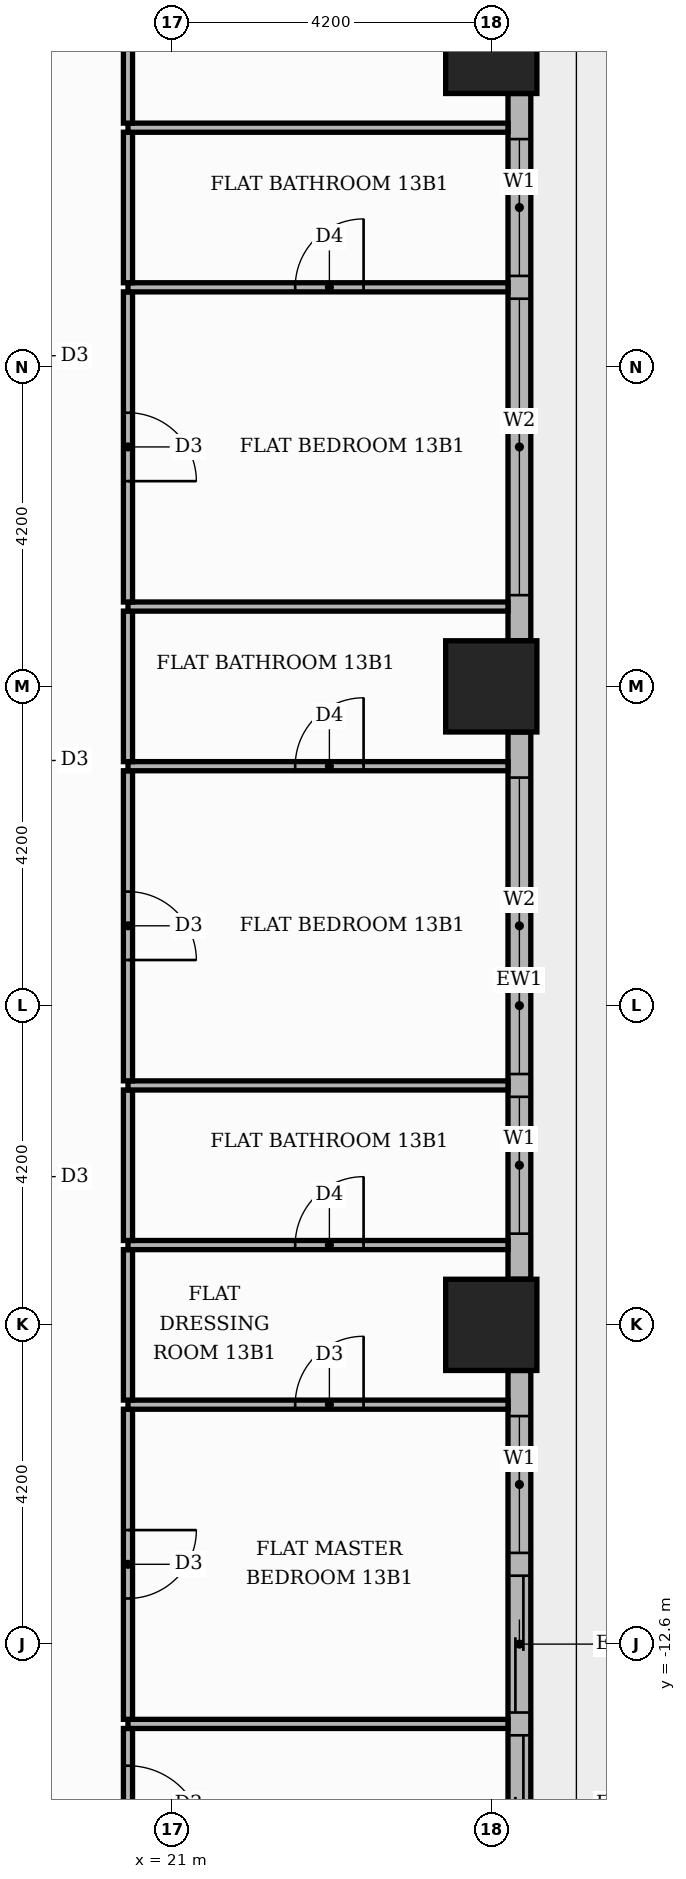
"""IFC4 building model, lengths in metres.
Left out: names, types, materials, properties, quantities, classifications, styles, units other than length and angle.
Written with IfcOpenShell. Run it as: python <this file> out.ifc"""

import sys

from ifc_helpers import new_model, si_unit, direction, frame, frame_2d, origin, origin_2d, place, context, subcontext, project, spatial, rectangle, extrude, element, fill, save


model = new_model("IFC4")
c1 = context("Model", 3, precision=1e-05, world=origin(), true_north=direction((0.0, 1.0)))
c2 = subcontext(c1, "Body", "Model", "MODEL_VIEW")
j1 = project(units=[si_unit("LENGTHUNIT", "METRE"), si_unit("PLANEANGLEUNIT", "RADIAN")], contexts=[c1])
p1 = place(None, origin())
s1 = spatial("IfcSite", under=j1, at=p1, CompositionType="ELEMENT")
p2 = place(p1, origin())
s2 = spatial("IfcBuilding", under=s1, at=p2, CompositionType="ELEMENT")
p3 = place(p2, frame((0.0, 0.0, 58.2)))
s3 = spatial("IfcBuildingStorey", under=s2, at=p3, CompositionType="ELEMENT", Elevation=58.2)
for number, where, z_axis, x_axis in (
    (1, (25.2, 0.0, 0.0), (0.0, 0.0, 1.0), (1.0, 0.0, 0.0)),
    (2, (25.2, 8.4, 0.0), (0.0, 0.0, 1.0), (1.0, 0.0, 0.0)),
    (3, (25.2, -8.4, 0.0), (0.0, 0.0, 1.0), (1.0, 0.0, 0.0)),
):
    element("IfcColumn", number, at=place(p3, frame(where, z_axis=z_axis, x_axis=x_axis)), inside=s3, PredefinedType="COLUMN", context=c2, shape_type="SweptSolid", body=[
        extrude(rectangle(XDim=1.2, YDim=1.2, at=origin_2d()), origin(), (0.0, 0.0, 1.0), 3.9),
    ])
p4 = place(p3, frame((25.57, -16.2, 0.0), z_axis=(0.0, 0.0, 1.0), x_axis=(0.0, 1.0, 0.0)))
e4 = element("IfcWall", 4, at=p4, inside=s3, PredefinedType="STANDARD", context=c2, shape_type="SweptSolid", body=[
    extrude(rectangle(XDim=7.2, YDim=0.3, at=frame_2d((3.6, 0.0))), origin(), (0.0, 0.0, 1.0), 3.48),
])
p5 = place(p4, frame((0.6, 0.0, 0.0)))
e5 = element("IfcOpeningElement", 5, at=p5, cuts=e4, PredefinedType="OPENING", context=c2, shape_type="SweptSolid", body=[
    extrude(rectangle(XDim=1.8, YDim=2.4, at=frame_2d((0.9, 1.2))), frame((0.0, 0.16, 0.0), z_axis=(0.0, -1.0, 0.0), x_axis=(1.0, 0.0, 0.0)), (0.0, 0.0, 1.0), 0.32),
])
p6 = place(p4, frame((2.7, 0.0, 0.0)))
e6 = element("IfcOpeningElement", 6, at=p6, cuts=e4, PredefinedType="OPENING", context=c2, shape_type="SweptSolid", body=[
    extrude(rectangle(XDim=1.8, YDim=2.4, at=frame_2d((0.9, 1.2))), frame((0.0, 0.16, 0.0), z_axis=(0.0, -1.0, 0.0), x_axis=(1.0, 0.0, 0.0)), (0.0, 0.0, 1.0), 0.32),
])
p7 = place(p4, frame((4.8, 0.0, 0.9)))
e7 = element("IfcOpeningElement", 7, at=p7, cuts=e4, PredefinedType="OPENING", context=c2, shape_type="SweptSolid", body=[
    extrude(rectangle(XDim=1.8, YDim=2.1, at=frame_2d((0.9, 1.05))), frame((0.0, 0.16, 0.0), z_axis=(0.0, -1.0, 0.0), x_axis=(1.0, 0.0, 0.0)), (0.0, 0.0, 1.0), 0.32),
])
p8 = place(p3, frame((25.57, -7.8, 0.0), z_axis=(0.0, 0.0, 1.0), x_axis=(0.0, 1.0, 0.0)))
e8 = element("IfcWall", 8, at=p8, inside=s3, PredefinedType="STANDARD", context=c2, shape_type="SweptSolid", body=[
    extrude(rectangle(XDim=7.2, YDim=0.3, at=frame_2d((3.6, 0.0))), origin(), (0.0, 0.0, 1.0), 3.48),
])
p9 = place(p8, frame((0.6, 0.0, 0.9)))
e9 = element("IfcOpeningElement", 9, at=p9, cuts=e8, PredefinedType="OPENING", context=c2, shape_type="SweptSolid", body=[
    extrude(rectangle(XDim=1.8, YDim=2.1, at=frame_2d((0.9, 1.05))), frame((0.0, 0.16, 0.0), z_axis=(0.0, -1.0, 0.0), x_axis=(1.0, 0.0, 0.0)), (0.0, 0.0, 1.0), 0.32),
])
p10 = place(p8, frame((2.7, 0.0, 0.9)))
e10 = element("IfcOpeningElement", 10, at=p10, cuts=e8, PredefinedType="OPENING", context=c2, shape_type="SweptSolid", body=[
    extrude(rectangle(XDim=3.9, YDim=2.1, at=frame_2d((1.95, 1.05))), frame((0.0, 0.16, 0.0), z_axis=(0.0, -1.0, 0.0), x_axis=(1.0, 0.0, 0.0)), (0.0, 0.0, 1.0), 0.32),
])
p11 = place(p3, frame((25.57, 0.6, 0.0), z_axis=(0.0, 0.0, 1.0), x_axis=(0.0, 1.0, 0.0)))
e11 = element("IfcWall", 11, at=p11, inside=s3, PredefinedType="STANDARD", context=c2, shape_type="SweptSolid", body=[
    extrude(rectangle(XDim=7.2, YDim=0.3, at=frame_2d((3.6, 0.0))), origin(), (0.0, 0.0, 1.0), 3.48),
])
p12 = place(p11, frame((0.6, 0.0, 0.9)))
e12 = element("IfcOpeningElement", 12, at=p12, cuts=e11, PredefinedType="OPENING", context=c2, shape_type="SweptSolid", body=[
    extrude(rectangle(XDim=3.9, YDim=2.1, at=frame_2d((1.95, 1.05))), frame((0.0, 0.16, 0.0), z_axis=(0.0, -1.0, 0.0), x_axis=(1.0, 0.0, 0.0)), (0.0, 0.0, 1.0), 0.32),
])
p13 = place(p11, frame((4.8, 0.0, 0.9)))
e13 = element("IfcOpeningElement", 13, at=p13, cuts=e11, PredefinedType="OPENING", context=c2, shape_type="SweptSolid", body=[
    extrude(rectangle(XDim=1.8, YDim=2.1, at=frame_2d((0.9, 1.05))), frame((0.0, 0.16, 0.0), z_axis=(0.0, -1.0, 0.0), x_axis=(1.0, 0.0, 0.0)), (0.0, 0.0, 1.0), 0.32),
])
p14 = place(p3, frame((20.42, -15.69, 0.0), z_axis=(0.0, 0.0, 1.0), x_axis=(0.0, 1.0, 0.0)))
e14 = element("IfcWall", 14, at=p14, inside=s3, PredefinedType="PARTITIONING", context=c2, shape_type="SweptSolid", body=[
    extrude(rectangle(XDim=1.98, YDim=0.12, at=frame_2d((0.99, 0.0))), origin(), (0.0, 0.0, 1.0), 3.48),
])
p15 = place(p14, frame((0.49, 0.0, 0.0)))
e15 = element("IfcOpeningElement", 15, at=p15, cuts=e14, PredefinedType="OPENING", context=c2, shape_type="SweptSolid", body=[
    extrude(rectangle(XDim=1.0, YDim=2.1, at=frame_2d((0.5, 1.05))), frame((0.0, 0.07, 0.0), z_axis=(0.0, -1.0, 0.0), x_axis=(1.0, 0.0, 0.0)), (0.0, 0.0, 1.0), 0.14),
])
p16 = place(p3, frame((20.42, -13.65, 0.0), z_axis=(0.0, 0.0, 1.0), x_axis=(1.0, 0.0, 0.0)))
e16 = element("IfcWall", 16, at=p16, inside=s3, PredefinedType="PARTITIONING", context=c2, shape_type="SweptSolid", body=[
    extrude(rectangle(XDim=5.0, YDim=0.12, at=frame_2d((2.5, 0.0))), origin(), (0.0, 0.0, 1.0), 3.48),
])
p17 = place(p3, frame((20.42, -13.59, 0.0), z_axis=(0.0, 0.0, 1.0), x_axis=(0.0, 1.0, 0.0)))
e17 = element("IfcWall", 17, at=p17, inside=s3, PredefinedType="PARTITIONING", context=c2, shape_type="SweptSolid", body=[
    extrude(rectangle(XDim=4.08, YDim=0.12, at=frame_2d((2.04, 0.0))), origin(), (0.0, 0.0, 1.0), 3.48),
])
p18 = place(p17, frame((1.59, 0.0, 0.0)))
e18 = element("IfcOpeningElement", 18, at=p18, cuts=e17, PredefinedType="OPENING", context=c2, shape_type="SweptSolid", body=[
    extrude(rectangle(XDim=0.9, YDim=2.1, at=frame_2d((0.45, 1.05))), frame((0.0, 0.07, 0.0), z_axis=(0.0, -1.0, 0.0), x_axis=(1.0, 0.0, 0.0)), (0.0, 0.0, 1.0), 0.14),
])
p19 = place(p3, frame((20.42, -9.45, 0.0), z_axis=(0.0, 0.0, 1.0), x_axis=(1.0, 0.0, 0.0)))
e19 = element("IfcWall", 19, at=p19, inside=s3, PredefinedType="PARTITIONING", context=c2, shape_type="SweptSolid", body=[
    extrude(rectangle(XDim=5.0, YDim=0.12, at=frame_2d((2.5, 0.0))), origin(), (0.0, 0.0, 1.0), 3.48),
])
p20 = place(p19, frame((2.2, 0.0, 0.0)))
e20 = element("IfcOpeningElement", 20, at=p20, cuts=e19, PredefinedType="OPENING", context=c2, shape_type="SweptSolid", body=[
    extrude(rectangle(XDim=0.9, YDim=2.1, at=frame_2d((0.45, 1.05))), frame((0.0, 0.07, 0.0), z_axis=(0.0, -1.0, 0.0), x_axis=(1.0, 0.0, 0.0)), (0.0, 0.0, 1.0), 0.14),
])
p21 = place(p3, frame((20.42, -9.39, 0.0), z_axis=(0.0, 0.0, 1.0), x_axis=(0.0, 1.0, 0.0)))
e21 = element("IfcWall", 21, at=p21, inside=s3, PredefinedType="PARTITIONING", context=c2, shape_type="SweptSolid", body=[
    extrude(rectangle(XDim=1.98, YDim=0.12, at=frame_2d((0.99, 0.0))), origin(), (0.0, 0.0, 1.0), 3.48),
])
p22 = place(p3, frame((20.42, -7.35, 0.0), z_axis=(0.0, 0.0, 1.0), x_axis=(1.0, 0.0, 0.0)))
e22 = element("IfcWall", 22, at=p22, inside=s3, PredefinedType="PARTITIONING", context=c2, shape_type="SweptSolid", body=[
    extrude(rectangle(XDim=5.0, YDim=0.12, at=frame_2d((2.5, 0.0))), origin(), (0.0, 0.0, 1.0), 3.48),
])
p23 = place(p22, frame((2.2, 0.0, 0.0)))
e23 = element("IfcOpeningElement", 23, at=p23, cuts=e22, PredefinedType="OPENING", context=c2, shape_type="SweptSolid", body=[
    extrude(rectangle(XDim=0.9, YDim=2.1, at=frame_2d((0.45, 1.05))), frame((0.0, 0.07, 0.0), z_axis=(0.0, -1.0, 0.0), x_axis=(1.0, 0.0, 0.0)), (0.0, 0.0, 1.0), 0.14),
])
p24 = place(p3, frame((20.42, -7.29, 0.0), z_axis=(0.0, 0.0, 1.0), x_axis=(0.0, 1.0, 0.0)))
e24 = element("IfcWall", 24, at=p24, inside=s3, PredefinedType="PARTITIONING", context=c2, shape_type="SweptSolid", body=[
    extrude(rectangle(XDim=1.98, YDim=0.12, at=frame_2d((0.99, 0.0))), origin(), (0.0, 0.0, 1.0), 3.48),
])
p25 = place(p3, frame((20.42, -5.25, 0.0), z_axis=(0.0, 0.0, 1.0), x_axis=(1.0, 0.0, 0.0)))
e25 = element("IfcWall", 25, at=p25, inside=s3, PredefinedType="PARTITIONING", context=c2, shape_type="SweptSolid", body=[
    extrude(rectangle(XDim=5.0, YDim=0.12, at=frame_2d((2.5, 0.0))), origin(), (0.0, 0.0, 1.0), 3.48),
])
p26 = place(p3, frame((20.42, -5.19, 0.0), z_axis=(0.0, 0.0, 1.0), x_axis=(0.0, 1.0, 0.0)))
e26 = element("IfcWall", 26, at=p26, inside=s3, PredefinedType="PARTITIONING", context=c2, shape_type="SweptSolid", body=[
    extrude(rectangle(XDim=4.08, YDim=0.12, at=frame_2d((2.04, 0.0))), origin(), (0.0, 0.0, 1.0), 3.48),
])
p27 = place(p26, frame((1.59, 0.0, 0.0)))
e27 = element("IfcOpeningElement", 27, at=p27, cuts=e26, PredefinedType="OPENING", context=c2, shape_type="SweptSolid", body=[
    extrude(rectangle(XDim=0.9, YDim=2.1, at=frame_2d((0.45, 1.05))), frame((0.0, 0.07, 0.0), z_axis=(0.0, -1.0, 0.0), x_axis=(1.0, 0.0, 0.0)), (0.0, 0.0, 1.0), 0.14),
])
p28 = place(p3, frame((20.42, -1.05, 0.0), z_axis=(0.0, 0.0, 1.0), x_axis=(1.0, 0.0, 0.0)))
e28 = element("IfcWall", 28, at=p28, inside=s3, PredefinedType="PARTITIONING", context=c2, shape_type="SweptSolid", body=[
    extrude(rectangle(XDim=5.0, YDim=0.12, at=frame_2d((2.5, 0.0))), origin(), (0.0, 0.0, 1.0), 3.48),
])
p29 = place(p28, frame((2.2, 0.0, 0.0)))
e29 = element("IfcOpeningElement", 29, at=p29, cuts=e28, PredefinedType="OPENING", context=c2, shape_type="SweptSolid", body=[
    extrude(rectangle(XDim=0.9, YDim=2.1, at=frame_2d((0.45, 1.05))), frame((0.0, 0.07, 0.0), z_axis=(0.0, -1.0, 0.0), x_axis=(1.0, 0.0, 0.0)), (0.0, 0.0, 1.0), 0.14),
])
p30 = place(p3, frame((20.42, -0.99, 0.0), z_axis=(0.0, 0.0, 1.0), x_axis=(0.0, 1.0, 0.0)))
e30 = element("IfcWall", 30, at=p30, inside=s3, PredefinedType="PARTITIONING", context=c2, shape_type="SweptSolid", body=[
    extrude(rectangle(XDim=1.98, YDim=0.12, at=frame_2d((0.99, 0.0))), origin(), (0.0, 0.0, 1.0), 3.48),
])
p31 = place(p3, frame((20.42, 1.05, 0.0), z_axis=(0.0, 0.0, 1.0), x_axis=(1.0, 0.0, 0.0)))
e31 = element("IfcWall", 31, at=p31, inside=s3, PredefinedType="PARTITIONING", context=c2, shape_type="SweptSolid", body=[
    extrude(rectangle(XDim=5.0, YDim=0.12, at=frame_2d((2.5, 0.0))), origin(), (0.0, 0.0, 1.0), 3.48),
])
p32 = place(p3, frame((20.42, 1.11, 0.0), z_axis=(0.0, 0.0, 1.0), x_axis=(0.0, 1.0, 0.0)))
e32 = element("IfcWall", 32, at=p32, inside=s3, PredefinedType="PARTITIONING", context=c2, shape_type="SweptSolid", body=[
    extrude(rectangle(XDim=4.08, YDim=0.12, at=frame_2d((2.04, 0.0))), origin(), (0.0, 0.0, 1.0), 3.48),
])
p33 = place(p32, frame((1.59, 0.0, 0.0)))
e33 = element("IfcOpeningElement", 33, at=p33, cuts=e32, PredefinedType="OPENING", context=c2, shape_type="SweptSolid", body=[
    extrude(rectangle(XDim=0.9, YDim=2.1, at=frame_2d((0.45, 1.05))), frame((0.0, 0.07, 0.0), z_axis=(0.0, -1.0, 0.0), x_axis=(1.0, 0.0, 0.0)), (0.0, 0.0, 1.0), 0.14),
])
p34 = place(p3, frame((20.42, 5.25, 0.0), z_axis=(0.0, 0.0, 1.0), x_axis=(1.0, 0.0, 0.0)))
e34 = element("IfcWall", 34, at=p34, inside=s3, PredefinedType="PARTITIONING", context=c2, shape_type="SweptSolid", body=[
    extrude(rectangle(XDim=5.0, YDim=0.12, at=frame_2d((2.5, 0.0))), origin(), (0.0, 0.0, 1.0), 3.48),
])
p35 = place(p34, frame((2.2, 0.0, 0.0)))
e35 = element("IfcOpeningElement", 35, at=p35, cuts=e34, PredefinedType="OPENING", context=c2, shape_type="SweptSolid", body=[
    extrude(rectangle(XDim=0.9, YDim=2.1, at=frame_2d((0.45, 1.05))), frame((0.0, 0.07, 0.0), z_axis=(0.0, -1.0, 0.0), x_axis=(1.0, 0.0, 0.0)), (0.0, 0.0, 1.0), 0.14),
])
p36 = place(p3, frame((20.42, 5.31, 0.0), z_axis=(0.0, 0.0, 1.0), x_axis=(0.0, 1.0, 0.0)))
e36 = element("IfcWall", 36, at=p36, inside=s3, PredefinedType="PARTITIONING", context=c2, shape_type="SweptSolid", body=[
    extrude(rectangle(XDim=1.98, YDim=0.12, at=frame_2d((0.99, 0.0))), origin(), (0.0, 0.0, 1.0), 3.48),
])
p37 = place(p3, frame((20.42, 7.35, 0.0), z_axis=(0.0, 0.0, 1.0), x_axis=(1.0, 0.0, 0.0)))
e37 = element("IfcWall", 37, at=p37, inside=s3, PredefinedType="PARTITIONING", context=c2, shape_type="SweptSolid", body=[
    extrude(rectangle(XDim=5.0, YDim=0.12, at=frame_2d((2.5, 0.0))), origin(), (0.0, 0.0, 1.0), 3.48),
])
p38 = place(p3, frame((20.42, 7.41, 0.0), z_axis=(0.0, 0.0, 1.0), x_axis=(0.0, 1.0, 0.0)))
e38 = element("IfcWall", 38, at=p38, inside=s3, PredefinedType="PARTITIONING", context=c2, shape_type="SweptSolid", body=[
    extrude(rectangle(XDim=4.08, YDim=0.12, at=frame_2d((2.04, 0.0))), origin(), (0.0, 0.0, 1.0), 3.48),
])
p39 = place(p38, frame((1.59, 0.0, 0.0)))
e39 = element("IfcOpeningElement", 39, at=p39, cuts=e38, PredefinedType="OPENING", context=c2, shape_type="SweptSolid", body=[
    extrude(rectangle(XDim=0.9, YDim=2.1, at=frame_2d((0.45, 1.05))), frame((0.0, 0.07, 0.0), z_axis=(0.0, -1.0, 0.0), x_axis=(1.0, 0.0, 0.0)), (0.0, 0.0, 1.0), 0.14),
])
p40 = place(p5, origin())
e40 = element("IfcDoor", 40, at=p40, inside=s3, OperationType="SLIDING_TO_LEFT", PredefinedType="DOOR", context=c2, shape_type="SweptSolid", body=[
    extrude(rectangle(XDim=1.8, YDim=2.4, at=frame_2d((0.9, 1.2))), frame((0.0, 0.025, 0.0), z_axis=(0.0, -1.0, 0.0), x_axis=(1.0, 0.0, 0.0)), (0.0, 0.0, 1.0), 0.05),
])
fill(e5, e40)
p41 = place(p6, origin())
e41 = element("IfcDoor", 41, at=p41, inside=s3, OperationType="SLIDING_TO_RIGHT", PredefinedType="DOOR", context=c2, shape_type="SweptSolid", body=[
    extrude(rectangle(XDim=1.8, YDim=2.4, at=frame_2d((0.9, 1.2))), frame((0.0, 0.025, 0.0), z_axis=(0.0, -1.0, 0.0), x_axis=(1.0, 0.0, 0.0)), (0.0, 0.0, 1.0), 0.05),
])
fill(e6, e41)
p42 = place(p7, origin())
e42 = element("IfcWindow", 42, at=p42, inside=s3, PartitioningType="SINGLE_PANEL", PredefinedType="WINDOW", context=c2, shape_type="SweptSolid", body=[
    extrude(rectangle(XDim=1.8, YDim=2.1, at=frame_2d((0.9, 1.05))), frame((0.0, 0.03, 0.0), z_axis=(0.0, -1.0, 0.0), x_axis=(1.0, 0.0, 0.0)), (0.0, 0.0, 1.0), 0.06),
])
fill(e7, e42)
p43 = place(p9, origin())
e43 = element("IfcWindow", 43, at=p43, inside=s3, PartitioningType="SINGLE_PANEL", PredefinedType="WINDOW", context=c2, shape_type="SweptSolid", body=[
    extrude(rectangle(XDim=1.8, YDim=2.1, at=frame_2d((0.9, 1.05))), frame((0.0, 0.03, 0.0), z_axis=(0.0, -1.0, 0.0), x_axis=(1.0, 0.0, 0.0)), (0.0, 0.0, 1.0), 0.06),
])
fill(e9, e43)
p44 = place(p10, origin())
e44 = element("IfcWindow", 44, at=p44, inside=s3, PartitioningType="SINGLE_PANEL", PredefinedType="WINDOW", context=c2, shape_type="SweptSolid", body=[
    extrude(rectangle(XDim=3.9, YDim=2.1, at=frame_2d((1.95, 1.05))), frame((0.0, 0.03, 0.0), z_axis=(0.0, -1.0, 0.0), x_axis=(1.0, 0.0, 0.0)), (0.0, 0.0, 1.0), 0.06),
])
fill(e10, e44)
p45 = place(p12, origin())
e45 = element("IfcWindow", 45, at=p45, inside=s3, PartitioningType="SINGLE_PANEL", PredefinedType="WINDOW", context=c2, shape_type="SweptSolid", body=[
    extrude(rectangle(XDim=3.9, YDim=2.1, at=frame_2d((1.95, 1.05))), frame((0.0, 0.03, 0.0), z_axis=(0.0, -1.0, 0.0), x_axis=(1.0, 0.0, 0.0)), (0.0, 0.0, 1.0), 0.06),
])
fill(e12, e45)
p46 = place(p13, origin())
e46 = element("IfcWindow", 46, at=p46, inside=s3, PartitioningType="SINGLE_PANEL", PredefinedType="WINDOW", context=c2, shape_type="SweptSolid", body=[
    extrude(rectangle(XDim=1.8, YDim=2.1, at=frame_2d((0.9, 1.05))), frame((0.0, 0.03, 0.0), z_axis=(0.0, -1.0, 0.0), x_axis=(1.0, 0.0, 0.0)), (0.0, 0.0, 1.0), 0.06),
])
fill(e13, e46)
p47 = place(p15, frame((1.0, 0.0, 0.0), z_axis=(0.0, 0.0, 1.0), x_axis=(-1.0, 0.0, 0.0)))
e47 = element("IfcDoor", 47, at=p47, inside=s3, OperationType="SINGLE_SWING_LEFT", PredefinedType="DOOR", context=c2, shape_type="SweptSolid", body=[
    extrude(rectangle(XDim=1.0, YDim=2.1, at=frame_2d((0.5, 1.05))), frame((0.0, 0.025, 0.0), z_axis=(0.0, -1.0, 0.0), x_axis=(1.0, 0.0, 0.0)), (0.0, 0.0, 1.0), 0.05),
])
fill(e15, e47)
p48 = place(p18, frame((0.9, 0.0, 0.0), z_axis=(0.0, 0.0, 1.0), x_axis=(-1.0, 0.0, 0.0)))
e48 = element("IfcDoor", 48, at=p48, inside=s3, OperationType="SINGLE_SWING_RIGHT", PredefinedType="DOOR", context=c2, shape_type="SweptSolid", body=[
    extrude(rectangle(XDim=0.9, YDim=2.1, at=frame_2d((0.45, 1.05))), frame((0.0, 0.025, 0.0), z_axis=(0.0, -1.0, 0.0), x_axis=(1.0, 0.0, 0.0)), (0.0, 0.0, 1.0), 0.05),
])
fill(e18, e48)
p49 = place(p20, origin())
e49 = element("IfcDoor", 49, at=p49, inside=s3, OperationType="SINGLE_SWING_RIGHT", PredefinedType="DOOR", context=c2, shape_type="SweptSolid", body=[
    extrude(rectangle(XDim=0.9, YDim=2.1, at=frame_2d((0.45, 1.05))), frame((0.0, 0.025, 0.0), z_axis=(0.0, -1.0, 0.0), x_axis=(1.0, 0.0, 0.0)), (0.0, 0.0, 1.0), 0.05),
])
fill(e20, e49)
p50 = place(p23, origin())
e50 = element("IfcDoor", 50, at=p50, inside=s3, OperationType="SINGLE_SWING_RIGHT", PredefinedType="DOOR", context=c2, shape_type="SweptSolid", body=[
    extrude(rectangle(XDim=0.9, YDim=2.1, at=frame_2d((0.45, 1.05))), frame((0.0, 0.025, 0.0), z_axis=(0.0, -1.0, 0.0), x_axis=(1.0, 0.0, 0.0)), (0.0, 0.0, 1.0), 0.05),
])
fill(e23, e50)
p51 = place(p27, frame((0.9, 0.0, 0.0), z_axis=(0.0, 0.0, 1.0), x_axis=(-1.0, 0.0, 0.0)))
e51 = element("IfcDoor", 51, at=p51, inside=s3, OperationType="SINGLE_SWING_LEFT", PredefinedType="DOOR", context=c2, shape_type="SweptSolid", body=[
    extrude(rectangle(XDim=0.9, YDim=2.1, at=frame_2d((0.45, 1.05))), frame((0.0, 0.025, 0.0), z_axis=(0.0, -1.0, 0.0), x_axis=(1.0, 0.0, 0.0)), (0.0, 0.0, 1.0), 0.05),
])
fill(e27, e51)
p52 = place(p29, origin())
e52 = element("IfcDoor", 52, at=p52, inside=s3, OperationType="SINGLE_SWING_RIGHT", PredefinedType="DOOR", context=c2, shape_type="SweptSolid", body=[
    extrude(rectangle(XDim=0.9, YDim=2.1, at=frame_2d((0.45, 1.05))), frame((0.0, 0.025, 0.0), z_axis=(0.0, -1.0, 0.0), x_axis=(1.0, 0.0, 0.0)), (0.0, 0.0, 1.0), 0.05),
])
fill(e29, e52)
p53 = place(p33, frame((0.9, 0.0, 0.0), z_axis=(0.0, 0.0, 1.0), x_axis=(-1.0, 0.0, 0.0)))
e53 = element("IfcDoor", 53, at=p53, inside=s3, OperationType="SINGLE_SWING_LEFT", PredefinedType="DOOR", context=c2, shape_type="SweptSolid", body=[
    extrude(rectangle(XDim=0.9, YDim=2.1, at=frame_2d((0.45, 1.05))), frame((0.0, 0.025, 0.0), z_axis=(0.0, -1.0, 0.0), x_axis=(1.0, 0.0, 0.0)), (0.0, 0.0, 1.0), 0.05),
])
fill(e33, e53)
p54 = place(p35, origin())
e54 = element("IfcDoor", 54, at=p54, inside=s3, OperationType="SINGLE_SWING_RIGHT", PredefinedType="DOOR", context=c2, shape_type="SweptSolid", body=[
    extrude(rectangle(XDim=0.9, YDim=2.1, at=frame_2d((0.45, 1.05))), frame((0.0, 0.025, 0.0), z_axis=(0.0, -1.0, 0.0), x_axis=(1.0, 0.0, 0.0)), (0.0, 0.0, 1.0), 0.05),
])
fill(e35, e54)
save(model, sys.argv[1])
